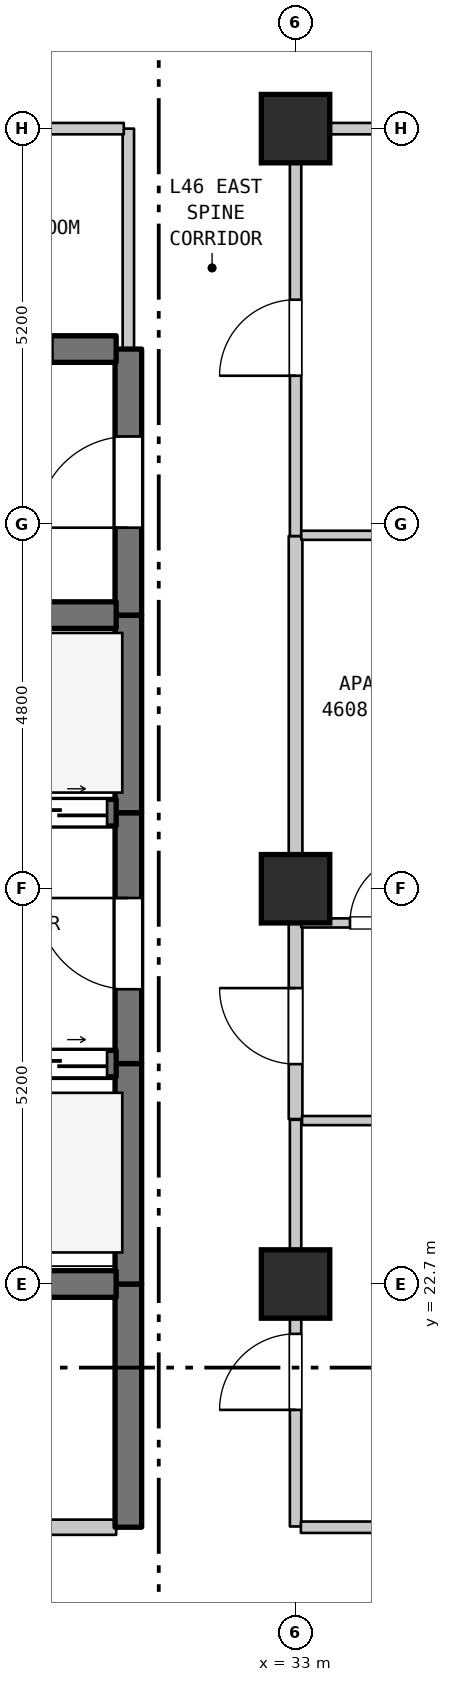
"""IFC4 building model, lengths in metres.
Left out: names, types, materials, properties, quantities, classifications, styles, units other than length and angle.
Written with IfcOpenShell. Run it as: python <this file> out.ifc"""

import sys

from ifc_helpers import new_model, si_unit, direction, frame, frame_2d, origin, origin_2d, place, context, subcontext, project, spatial, rectangle, extrude, element, fill, save


model = new_model("IFC4")
c1 = context("Model", 3, precision=1e-05, world=origin(), true_north=direction((0.0, 1.0)))
c2 = subcontext(c1, "Body", "Model", "MODEL_VIEW")
j1 = project(units=[si_unit("LENGTHUNIT", "METRE"), si_unit("PLANEANGLEUNIT", "RADIAN")], contexts=[c1])
p1 = place(None, origin())
s1 = spatial("IfcSite", under=j1, at=p1, CompositionType="ELEMENT")
p2 = place(p1, origin())
s2 = spatial("IfcBuilding", under=s1, at=p2, CompositionType="ELEMENT")
p3 = place(p2, frame((0.0, 0.0, 188.4)))
s3 = spatial("IfcBuildingStorey", under=s2, at=p3, CompositionType="ELEMENT", Elevation=188.4)
for number, where, z_axis, x_axis in (
    (1, (33.0, 22.7, 0.0), (0.0, 0.0, 1.0), (1.0, 0.0, 0.0)),
    (2, (33.0, 27.9, 0.0), (0.0, 0.0, 1.0), (1.0, 0.0, 0.0)),
    (3, (33.0, 37.9, 0.0), (0.0, 0.0, 1.0), (1.0, 0.0, 0.0)),
):
    element("IfcColumn", number, at=place(p3, frame(where, z_axis=z_axis, x_axis=x_axis)), inside=s3, PredefinedType="COLUMN", context=c2, shape_type="SweptSolid", body=[
        extrude(rectangle(XDim=0.9, YDim=0.9, at=origin_2d()), origin(), (0.0, 0.0, 1.0), 3.7),
    ])
p4 = place(p3, frame((30.8, 19.5, 0.0), z_axis=(0.0, 0.0, 1.0), x_axis=(0.0, 1.0, 0.0)))
e4 = element("IfcWall", 4, at=p4, inside=s3, PredefinedType="SHEAR", context=c2, shape_type="SweptSolid", body=[
    extrude(rectangle(XDim=3.2, YDim=0.35, at=frame_2d((1.6, 0.0))), origin(), (0.0, 0.0, 1.0), 3.39),
])
p5 = place(p3, frame((30.8, 22.7, 0.0), z_axis=(0.0, 0.0, 1.0), x_axis=(0.0, 1.0, 0.0)))
e5 = element("IfcWall", 5, at=p5, inside=s3, PredefinedType="SHEAR", context=c2, shape_type="SweptSolid", body=[
    extrude(rectangle(XDim=2.9, YDim=0.35, at=frame_2d((1.45, 0.0))), origin(), (0.0, 0.0, 1.0), 3.39),
])
p6 = place(p3, frame((30.8, 25.6, 0.0), z_axis=(0.0, 0.0, 1.0), x_axis=(0.0, 1.0, 0.0)))
e6 = element("IfcWall", 6, at=p6, inside=s3, PredefinedType="SHEAR", context=c2, shape_type="SweptSolid", body=[
    extrude(rectangle(XDim=3.3, YDim=0.35, at=frame_2d((1.65, 0.0))), origin(), (0.0, 0.0, 1.0), 3.39),
])
p7 = place(p6, frame((0.978, 0.0, 0.0)))
e7 = element("IfcOpeningElement", 7, at=p7, cuts=e6, PredefinedType="OPENING", context=c2, shape_type="SweptSolid", body=[
    extrude(rectangle(XDim=1.2, YDim=2.2, at=frame_2d((0.6, 1.1))), frame((0.0, 0.185, 0.0), z_axis=(0.0, -1.0, 0.0), x_axis=(1.0, 0.0, 0.0)), (0.0, 0.0, 1.0), 0.37),
])
p8 = place(p3, frame((30.8, 28.9, 0.0), z_axis=(0.0, 0.0, 1.0), x_axis=(0.0, 1.0, 0.0)))
e8 = element("IfcWall", 8, at=p8, inside=s3, PredefinedType="SHEAR", context=c2, shape_type="SweptSolid", body=[
    extrude(rectangle(XDim=2.6, YDim=0.35, at=frame_2d((1.3, 0.0))), origin(), (0.0, 0.0, 1.0), 3.39),
])
p9 = place(p3, frame((30.8, 31.5, 0.0), z_axis=(0.0, 0.0, 1.0), x_axis=(0.0, 1.0, 0.0)))
e9 = element("IfcWall", 9, at=p9, inside=s3, PredefinedType="SHEAR", context=c2, shape_type="SweptSolid", body=[
    extrude(rectangle(XDim=3.5, YDim=0.35, at=frame_2d((1.75, 0.0))), origin(), (0.0, 0.0, 1.0), 3.39),
])
p10 = place(p9, frame((1.15, 0.0, 0.0)))
e10 = element("IfcOpeningElement", 10, at=p10, cuts=e9, PredefinedType="OPENING", context=c2, shape_type="SweptSolid", body=[
    extrude(rectangle(XDim=1.2, YDim=2.2, at=frame_2d((0.6, 1.1))), frame((0.0, 0.185, 0.0), z_axis=(0.0, -1.0, 0.0), x_axis=(1.0, 0.0, 0.0)), (0.0, 0.0, 1.0), 0.37),
])
p11 = place(p3, frame((30.8, 35.0, 0.0), z_axis=(0.0, 0.0, 1.0), x_axis=(0.0, 1.0, 0.0)))
e11 = element("IfcWall", 11, at=p11, inside=s3, PredefinedType="STANDARD", context=c2, shape_type="SweptSolid", body=[
    extrude(rectangle(XDim=2.9, YDim=0.15, at=frame_2d((1.45, 0.0))), origin(), (0.0, 0.0, 1.0), 3.39),
])
p12 = place(p3, frame((33.0, 19.51, 0.0), z_axis=(0.0, 0.0, 1.0), x_axis=(0.0, 1.0, 0.0)))
e12 = element("IfcWall", 12, at=p12, inside=s3, PredefinedType="STANDARD", context=c2, shape_type="SweptSolid", body=[
    extrude(rectangle(XDim=5.35, YDim=0.15, at=frame_2d((2.675, 0.0))), origin(), (0.0, 0.0, 1.0), 2.99),
])
p13 = place(p12, frame((1.534, 0.0, 0.0)))
e13 = element("IfcOpeningElement", 13, at=p13, cuts=e12, PredefinedType="OPENING", context=c2, shape_type="SweptSolid", body=[
    extrude(rectangle(XDim=1.0, YDim=2.15, at=frame_2d((0.5, 1.075))), frame((0.0, 0.085, 0.0), z_axis=(0.0, -1.0, 0.0), x_axis=(1.0, 0.0, 0.0)), (0.0, 0.0, 1.0), 0.17),
])
p14 = place(p3, frame((33.0, 24.87, 0.0), z_axis=(0.0, 0.0, 1.0), x_axis=(0.0, 1.0, 0.0)))
e14 = element("IfcWall", 14, at=p14, inside=s3, PredefinedType="STANDARD", context=c2, shape_type="SweptSolid", body=[
    extrude(rectangle(XDim=2.6, YDim=0.18, at=frame_2d((1.3, 0.0))), origin(), (0.0, 0.0, 1.0), 2.99),
])
p15 = place(p14, frame((0.723, 0.0, 0.0)))
e15 = element("IfcOpeningElement", 15, at=p15, cuts=e14, PredefinedType="OPENING", context=c2, shape_type="SweptSolid", body=[
    extrude(rectangle(XDim=1.0, YDim=2.15, at=frame_2d((0.5, 1.075))), frame((0.0, 0.1, 0.0), z_axis=(0.0, -1.0, 0.0), x_axis=(1.0, 0.0, 0.0)), (0.0, 0.0, 1.0), 0.2),
])
p16 = place(p3, frame((33.0, 27.47, 0.0), z_axis=(0.0, 0.0, 1.0), x_axis=(0.0, 1.0, 0.0)))
e16 = element("IfcWall", 16, at=p16, inside=s3, PredefinedType="STANDARD", context=c2, shape_type="SweptSolid", body=[
    extrude(rectangle(XDim=5.07, YDim=0.18, at=frame_2d((2.535, 0.0))), origin(), (0.0, 0.0, 1.0), 2.89),
])
p17 = place(p3, frame((33.0, 32.54, 0.0), z_axis=(0.0, 0.0, 1.0), x_axis=(0.0, 1.0, 0.0)))
e17 = element("IfcWall", 17, at=p17, inside=s3, PredefinedType="STANDARD", context=c2, shape_type="SweptSolid", body=[
    extrude(rectangle(XDim=5.36, YDim=0.15, at=frame_2d((2.68, 0.0))), origin(), (0.0, 0.0, 1.0), 2.89),
])
p18 = place(p17, frame((2.109, 0.0, 0.0)))
e18 = element("IfcOpeningElement", 18, at=p18, cuts=e17, PredefinedType="OPENING", context=c2, shape_type="SweptSolid", body=[
    extrude(rectangle(XDim=1.0, YDim=2.15, at=frame_2d((0.5, 1.075))), frame((0.0, 0.085, 0.0), z_axis=(0.0, -1.0, 0.0), x_axis=(1.0, 0.0, 0.0)), (0.0, 0.0, 1.0), 0.17),
])
p19 = place(p3, frame((25.985, 19.5, 0.0), z_axis=(0.0, 0.0, 1.0), x_axis=(1.0, 0.0, 0.0)))
e19 = element("IfcWall", 19, at=p19, inside=s3, PredefinedType="STANDARD", context=c2, shape_type="SweptSolid", body=[
    extrude(rectangle(XDim=4.655, YDim=0.2, at=frame_2d((2.327, 0.0))), origin(), (0.0, 0.0, 1.0), 3.39),
])
p20 = place(p19, frame((1.845, 0.0, 0.0)))
e20 = element("IfcOpeningElement", 20, at=p20, cuts=e19, PredefinedType="OPENING", context=c2, shape_type="SweptSolid", body=[
    extrude(rectangle(XDim=0.9, YDim=2.15, at=frame_2d((0.45, 1.075))), frame((0.0, 0.11, 0.0), z_axis=(0.0, -1.0, 0.0), x_axis=(1.0, 0.0, 0.0)), (0.0, 0.0, 1.0), 0.22),
])
p21 = place(p3, frame((33.07, 19.5, 0.0), z_axis=(0.0, 0.0, 1.0), x_axis=(1.0, 0.0, 0.0)))
e21 = element("IfcWall", 21, at=p21, inside=s3, PredefinedType="STANDARD", context=c2, shape_type="SweptSolid", body=[
    extrude(rectangle(XDim=21.51, YDim=0.15, at=frame_2d((10.755, 0.0))), origin(), (0.0, 0.0, 1.0), 3.39),
])
p22 = place(p21, frame((10.185, 0.0, 0.0)))
e22 = element("IfcOpeningElement", 22, at=p22, cuts=e21, PredefinedType="OPENING", context=c2, shape_type="SweptSolid", body=[
    extrude(rectangle(XDim=1.0, YDim=2.15, at=frame_2d((0.5, 1.075))), frame((0.0, 0.085, 0.0), z_axis=(0.0, -1.0, 0.0), x_axis=(1.0, 0.0, 0.0)), (0.0, 0.0, 1.0), 0.17),
])
p23 = place(p3, frame((27.46, 22.7, 0.0), z_axis=(0.0, 0.0, 1.0), x_axis=(1.0, 0.0, 0.0)))
e23 = element("IfcWall", 23, at=p23, inside=s3, PredefinedType="SHEAR", context=c2, shape_type="SweptSolid", body=[
    extrude(rectangle(XDim=3.18, YDim=0.35, at=frame_2d((1.59, 0.0))), origin(), (0.0, 0.0, 1.0), 3.39),
])
p24 = place(p3, frame((33.085, 24.85, 0.0), z_axis=(0.0, 0.0, 1.0), x_axis=(1.0, 0.0, 0.0)))
e24 = element("IfcWall", 24, at=p24, inside=s3, PredefinedType="PARTITIONING", context=c2, shape_type="SweptSolid", body=[
    extrude(rectangle(XDim=23.905, YDim=0.12, at=frame_2d((11.953, 0.0))), origin(), (0.0, 0.0, 1.0), 3.39),
])
p25 = place(p3, frame((27.46, 25.6, 0.0), z_axis=(0.0, 0.0, 1.0), x_axis=(1.0, 0.0, 0.0)))
e25 = element("IfcWall", 25, at=p25, inside=s3, PredefinedType="SHEAR", context=c2, shape_type="SweptSolid", body=[
    extrude(rectangle(XDim=3.18, YDim=0.35, at=frame_2d((1.59, 0.0))), origin(), (0.0, 0.0, 1.0), 3.39),
])
p26 = place(p25, frame((0.12, 0.0, 0.0)))
e26 = element("IfcOpeningElement", 26, at=p26, cuts=e25, PredefinedType="OPENING", context=c2, shape_type="SweptSolid", body=[
    extrude(rectangle(XDim=1.25, YDim=2.2, at=frame_2d((0.625, 1.1))), frame((0.0, 0.185, 0.0), z_axis=(0.0, -1.0, 0.0), x_axis=(1.0, 0.0, 0.0)), (0.0, 0.0, 1.0), 0.37),
])
p27 = place(p25, frame((1.81, 0.0, 0.0)))
e27 = element("IfcOpeningElement", 27, at=p27, cuts=e25, PredefinedType="OPENING", context=c2, shape_type="SweptSolid", body=[
    extrude(rectangle(XDim=1.25, YDim=2.2, at=frame_2d((0.625, 1.1))), frame((0.0, 0.185, 0.0), z_axis=(0.0, -1.0, 0.0), x_axis=(1.0, 0.0, 0.0)), (0.0, 0.0, 1.0), 0.37),
])
p28 = place(p3, frame((33.075, 27.45, 0.0), z_axis=(0.0, 0.0, 1.0), x_axis=(1.0, 0.0, 0.0)))
e28 = element("IfcWall", 28, at=p28, inside=s3, PredefinedType="PARTITIONING", context=c2, shape_type="SweptSolid", body=[
    extrude(rectangle(XDim=2.364, YDim=0.12, at=frame_2d((1.182, 0.0))), origin(), (0.0, 0.0, 1.0), 3.39),
])
p29 = place(p28, frame((0.641, 0.0, 0.0)))
e29 = element("IfcOpeningElement", 29, at=p29, cuts=e28, PredefinedType="OPENING", context=c2, shape_type="SweptSolid", body=[
    extrude(rectangle(XDim=0.9, YDim=2.15, at=frame_2d((0.45, 1.075))), frame((0.0, 0.07, 0.0), z_axis=(0.0, -1.0, 0.0), x_axis=(1.0, 0.0, 0.0)), (0.0, 0.0, 1.0), 0.14),
])
p30 = place(p3, frame((27.46, 28.9, 0.0), z_axis=(0.0, 0.0, 1.0), x_axis=(1.0, 0.0, 0.0)))
e30 = element("IfcWall", 30, at=p30, inside=s3, PredefinedType="SHEAR", context=c2, shape_type="SweptSolid", body=[
    extrude(rectangle(XDim=3.18, YDim=0.35, at=frame_2d((1.59, 0.0))), origin(), (0.0, 0.0, 1.0), 3.39),
])
p31 = place(p30, frame((0.12, 0.0, 0.0)))
e31 = element("IfcOpeningElement", 31, at=p31, cuts=e30, PredefinedType="OPENING", context=c2, shape_type="SweptSolid", body=[
    extrude(rectangle(XDim=1.25, YDim=2.2, at=frame_2d((0.625, 1.1))), frame((0.0, 0.185, 0.0), z_axis=(0.0, -1.0, 0.0), x_axis=(1.0, 0.0, 0.0)), (0.0, 0.0, 1.0), 0.37),
])
p32 = place(p30, frame((1.81, 0.0, 0.0)))
e32 = element("IfcOpeningElement", 32, at=p32, cuts=e30, PredefinedType="OPENING", context=c2, shape_type="SweptSolid", body=[
    extrude(rectangle(XDim=1.25, YDim=2.2, at=frame_2d((0.625, 1.1))), frame((0.0, 0.185, 0.0), z_axis=(0.0, -1.0, 0.0), x_axis=(1.0, 0.0, 0.0)), (0.0, 0.0, 1.0), 0.37),
])
p33 = place(p3, frame((27.46, 31.5, 0.0), z_axis=(0.0, 0.0, 1.0), x_axis=(1.0, 0.0, 0.0)))
e33 = element("IfcWall", 33, at=p33, inside=s3, PredefinedType="SHEAR", context=c2, shape_type="SweptSolid", body=[
    extrude(rectangle(XDim=3.18, YDim=0.35, at=frame_2d((1.59, 0.0))), origin(), (0.0, 0.0, 1.0), 3.39),
])
p34 = place(p3, frame((33.075, 32.55, 0.0), z_axis=(0.0, 0.0, 1.0), x_axis=(1.0, 0.0, 0.0)))
e34 = element("IfcWall", 34, at=p34, inside=s3, PredefinedType="PARTITIONING", context=c2, shape_type="SweptSolid", body=[
    extrude(rectangle(XDim=2.364, YDim=0.12, at=frame_2d((1.182, 0.0))), origin(), (0.0, 0.0, 1.0), 3.39),
])
p35 = place(p3, frame((28.045, 35.0, 0.0), z_axis=(0.0, 0.0, 1.0), x_axis=(1.0, 0.0, 0.0)))
e35 = element("IfcWall", 35, at=p35, inside=s3, PredefinedType="SHEAR", context=c2, shape_type="SweptSolid", body=[
    extrude(rectangle(XDim=2.595, YDim=0.35, at=frame_2d((1.297, 0.0))), origin(), (0.0, 0.0, 1.0), 3.39),
])
p36 = place(p35, frame((0.806, 0.0, 0.0)))
e36 = element("IfcOpeningElement", 36, at=p36, cuts=e35, PredefinedType="OPENING", context=c2, shape_type="SweptSolid", body=[
    extrude(rectangle(XDim=0.95, YDim=2.15, at=frame_2d((0.475, 1.075))), frame((0.0, 0.185, 0.0), z_axis=(0.0, -1.0, 0.0), x_axis=(1.0, 0.0, 0.0)), (0.0, 0.0, 1.0), 0.37),
])
p37 = place(p3, frame((28.045, 37.9, 0.0), z_axis=(0.0, 0.0, 1.0), x_axis=(1.0, 0.0, 0.0)))
e37 = element("IfcWall", 37, at=p37, inside=s3, PredefinedType="STANDARD", context=c2, shape_type="SweptSolid", body=[
    extrude(rectangle(XDim=2.695, YDim=0.15, at=frame_2d((1.348, 0.0))), origin(), (0.0, 0.0, 1.0), 2.89),
])
p38 = place(p3, frame((33.06, 37.9, 0.0), z_axis=(0.0, 0.0, 1.0), x_axis=(1.0, 0.0, 0.0)))
e38 = element("IfcWall", 38, at=p38, inside=s3, PredefinedType="STANDARD", context=c2, shape_type="SweptSolid", body=[
    extrude(rectangle(XDim=7.164, YDim=0.15, at=frame_2d((3.582, 0.0))), origin(), (0.0, 0.0, 1.0), 3.39),
])
p39 = place(p38, frame((3.004, 0.0, 0.0)))
e39 = element("IfcOpeningElement", 39, at=p39, cuts=e38, PredefinedType="OPENING", context=c2, shape_type="SweptSolid", body=[
    extrude(rectangle(XDim=1.0, YDim=2.15, at=frame_2d((0.5, 1.075))), frame((0.0, 0.085, 0.0), z_axis=(0.0, -1.0, 0.0), x_axis=(1.0, 0.0, 0.0)), (0.0, 0.0, 1.0), 0.17),
])
p40 = place(p7, origin())
e40 = element("IfcDoor", 40, at=p40, inside=s3, OperationType="SINGLE_SWING_RIGHT", PredefinedType="DOOR", context=c2, shape_type="SweptSolid", body=[
    extrude(rectangle(XDim=1.2, YDim=2.2, at=frame_2d((0.6, 1.1))), frame((0.0, 0.025, 0.0), z_axis=(0.0, -1.0, 0.0), x_axis=(1.0, 0.0, 0.0)), (0.0, 0.0, 1.0), 0.05),
])
fill(e7, e40)
p41 = place(p10, origin())
e41 = element("IfcDoor", 41, at=p41, inside=s3, OperationType="SINGLE_SWING_LEFT", PredefinedType="DOOR", context=c2, shape_type="SweptSolid", body=[
    extrude(rectangle(XDim=1.2, YDim=2.2, at=frame_2d((0.6, 1.1))), frame((0.0, 0.025, 0.0), z_axis=(0.0, -1.0, 0.0), x_axis=(1.0, 0.0, 0.0)), (0.0, 0.0, 1.0), 0.05),
])
fill(e10, e41)
p42 = place(p13, origin())
e42 = element("IfcDoor", 42, at=p42, inside=s3, OperationType="SINGLE_SWING_LEFT", PredefinedType="DOOR", context=c2, shape_type="SweptSolid", body=[
    extrude(rectangle(XDim=1.0, YDim=2.15, at=frame_2d((0.5, 1.075))), frame((0.0, 0.025, 0.0), z_axis=(0.0, -1.0, 0.0), x_axis=(1.0, 0.0, 0.0)), (0.0, 0.0, 1.0), 0.05),
])
fill(e13, e42)
p43 = place(p15, origin())
e43 = element("IfcDoor", 43, at=p43, inside=s3, OperationType="SINGLE_SWING_RIGHT", PredefinedType="DOOR", context=c2, shape_type="SweptSolid", body=[
    extrude(rectangle(XDim=1.0, YDim=2.15, at=frame_2d((0.5, 1.075))), frame((0.0, 0.025, 0.0), z_axis=(0.0, -1.0, 0.0), x_axis=(1.0, 0.0, 0.0)), (0.0, 0.0, 1.0), 0.05),
])
fill(e15, e43)
p44 = place(p18, origin())
e44 = element("IfcDoor", 44, at=p44, inside=s3, OperationType="SINGLE_SWING_LEFT", PredefinedType="DOOR", context=c2, shape_type="SweptSolid", body=[
    extrude(rectangle(XDim=1.0, YDim=2.15, at=frame_2d((0.5, 1.075))), frame((0.0, 0.025, 0.0), z_axis=(0.0, -1.0, 0.0), x_axis=(1.0, 0.0, 0.0)), (0.0, 0.0, 1.0), 0.05),
])
fill(e18, e44)
p45 = place(p27, origin())
e45 = element("IfcDoor", 45, at=p45, inside=s3, OperationType="DOUBLE_DOOR_SLIDING", PredefinedType="DOOR", context=c2, shape_type="SweptSolid", body=[
    extrude(rectangle(XDim=1.25, YDim=2.2, at=frame_2d((0.625, 1.1))), frame((0.0, 0.025, 0.0), z_axis=(0.0, -1.0, 0.0), x_axis=(1.0, 0.0, 0.0)), (0.0, 0.0, 1.0), 0.05),
])
fill(e27, e45)
p46 = place(p29, origin())
e46 = element("IfcDoor", 46, at=p46, inside=s3, OperationType="SINGLE_SWING_RIGHT", PredefinedType="DOOR", context=c2, shape_type="SweptSolid", body=[
    extrude(rectangle(XDim=0.9, YDim=2.15, at=frame_2d((0.45, 1.075))), frame((0.0, 0.025, 0.0), z_axis=(0.0, -1.0, 0.0), x_axis=(1.0, 0.0, 0.0)), (0.0, 0.0, 1.0), 0.05),
])
fill(e29, e46)
p47 = place(p32, origin())
e47 = element("IfcDoor", 47, at=p47, inside=s3, OperationType="DOUBLE_DOOR_SLIDING", PredefinedType="DOOR", context=c2, shape_type="SweptSolid", body=[
    extrude(rectangle(XDim=1.25, YDim=2.2, at=frame_2d((0.625, 1.1))), frame((0.0, 0.025, 0.0), z_axis=(0.0, -1.0, 0.0), x_axis=(1.0, 0.0, 0.0)), (0.0, 0.0, 1.0), 0.05),
])
fill(e32, e47)
p48 = place(p36, frame((0.95, 0.0, 0.0), z_axis=(0.0, 0.0, 1.0), x_axis=(-1.0, 0.0, 0.0)))
e48 = element("IfcDoor", 48, at=p48, inside=s3, OperationType="SINGLE_SWING_LEFT", PredefinedType="DOOR", context=c2, shape_type="SweptSolid", body=[
    extrude(rectangle(XDim=0.95, YDim=2.15, at=frame_2d((0.475, 1.075))), frame((0.0, 0.025, 0.0), z_axis=(0.0, -1.0, 0.0), x_axis=(1.0, 0.0, 0.0)), (0.0, 0.0, 1.0), 0.05),
])
fill(e36, e48)
save(model, sys.argv[1])
